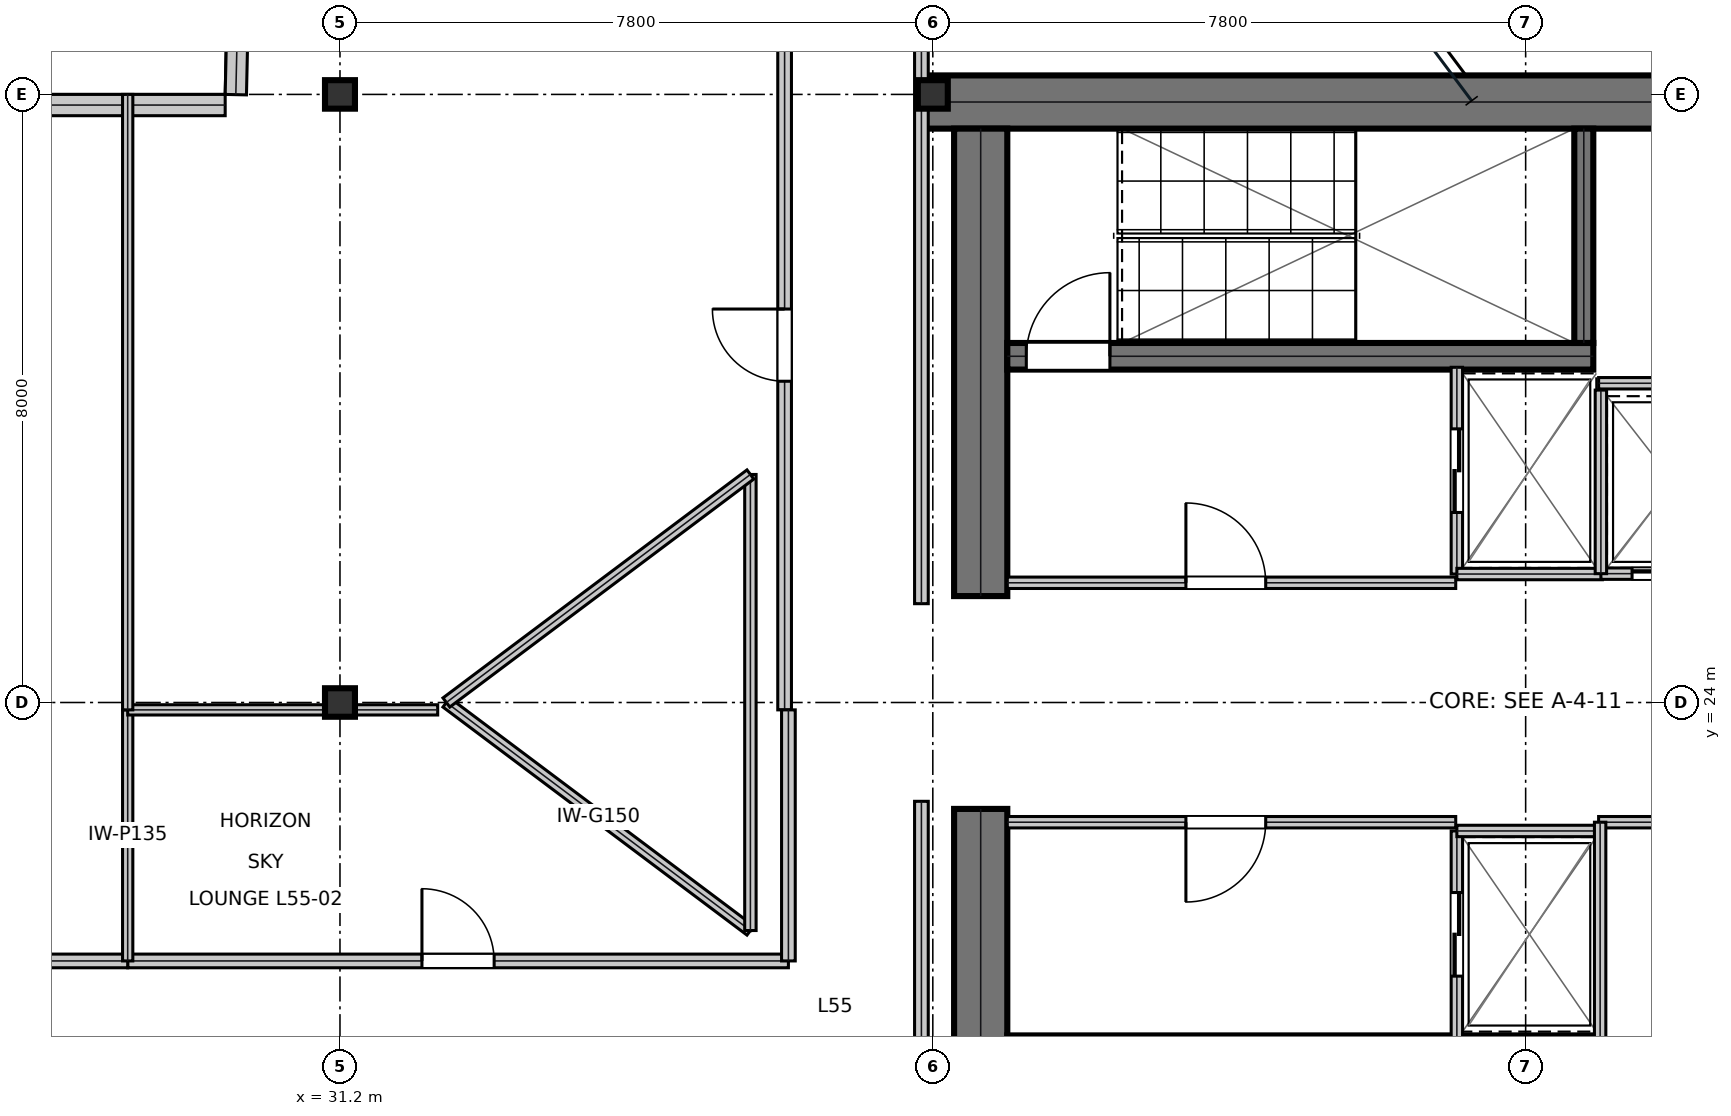
"""IFC4 building model, lengths in metres.
Left out: names, types, materials, properties, quantities, classifications, styles, units other than length and angle.
Written with IfcOpenShell. Run it as: python <this file> out.ifc"""

import sys

from ifc_helpers import new_model, si_unit, direction, frame, frame_2d, origin, origin_2d, place, context, subcontext, project, spatial, rectangle, i_section, extrude, element, fill, save


model = new_model("IFC4")
c1 = context("Model", 3, precision=1e-05, world=origin(), true_north=direction((0.0, 1.0)))
c2 = subcontext(c1, "Body", "Model", "MODEL_VIEW")
j1 = project(units=[si_unit("LENGTHUNIT", "METRE"), si_unit("PLANEANGLEUNIT", "RADIAN")], contexts=[c1])
p1 = place(None, origin())
s1 = spatial("IfcSite", under=j1, at=p1, CompositionType="ELEMENT")
p2 = place(p1, origin())
s2 = spatial("IfcBuilding", under=s1, at=p2, CompositionType="ELEMENT")
p3 = place(p2, frame((0.0, 0.0, 236.4)))
s3 = spatial("IfcBuildingStorey", under=s2, at=p3, CompositionType="ELEMENT", Elevation=236.4)
p4 = place(p3, frame((38.8, 31.9, 0.0), z_axis=(0.0, 0.0, 1.0), x_axis=(1.0, 0.0, 0.0)))
e1 = element("IfcWall", 1, at=p4, inside=s3, PredefinedType="SHEAR", context=c2, shape_type="SweptSolid", body=[
    extrude(rectangle(XDim=16.0, YDim=0.7, at=frame_2d((8.0, 0.0))), origin(), (0.0, 0.0, 1.0), 3.79),
])
for number, where, z_axis, x_axis in (
    (2, (39.63, 16.45, 0.0), (0.0, 0.0, 1.0), (0.0, 1.0, 0.0)),
    (3, (39.63, 25.4, 0.0), (0.0, 0.0, 1.0), (0.0, 1.0, 0.0)),
):
    element("IfcWall", number, at=place(p3, frame(where, z_axis=z_axis, x_axis=x_axis)), inside=s3, PredefinedType="SHEAR", context=c2, shape_type="SweptSolid", body=[
        extrude(rectangle(XDim=6.15, YDim=0.7, at=frame_2d((3.075, 0.0))), origin(), (0.0, 0.0, 1.0), 3.79),
    ])
p5 = place(p3, frame((39.98, 28.555, 0.0), z_axis=(0.0, 0.0, 1.0), x_axis=(1.0, 0.0, 0.0)))
e4 = element("IfcWall", 4, at=p5, inside=s3, PredefinedType="SHEAR", context=c2, shape_type="SweptSolid", body=[
    extrude(rectangle(XDim=7.71, YDim=0.35, at=frame_2d((3.855, 0.0))), origin(), (0.0, 0.0, 1.0), 3.79),
])
p6 = place(p5, frame((0.25, 0.0, 0.0)))
e5 = element("IfcOpeningElement", 5, at=p6, cuts=e4, PredefinedType="OPENING", context=c2, shape_type="SweptSolid", body=[
    extrude(rectangle(XDim=1.1, YDim=2.15, at=frame_2d((0.55, 1.075))), frame((0.0, 0.185, 0.0), z_axis=(0.0, -1.0, 0.0), x_axis=(1.0, 0.0, 0.0)), (0.0, 0.0, 1.0), 0.37),
])
p7 = place(p3, frame((39.98, 19.445, 0.0), z_axis=(0.0, 0.0, 1.0), x_axis=(1.0, 0.0, 0.0)))
e6 = element("IfcWall", 6, at=p7, inside=s3, PredefinedType="SHEAR", context=c2, shape_type="SweptSolid", body=[
    extrude(rectangle(XDim=7.71, YDim=0.35, at=frame_2d((3.855, 0.0))), origin(), (0.0, 0.0, 1.0), 3.79),
])
p8 = place(p7, frame((0.25, 0.0, 0.0)))
e7 = element("IfcOpeningElement", 7, at=p8, cuts=e6, PredefinedType="OPENING", context=c2, shape_type="SweptSolid", body=[
    extrude(rectangle(XDim=1.1, YDim=2.15, at=frame_2d((0.55, 1.075))), frame((0.0, 0.185, 0.0), z_axis=(0.0, -1.0, 0.0), x_axis=(1.0, 0.0, 0.0)), (0.0, 0.0, 1.0), 0.37),
])
p9 = place(p3, frame((47.565, 28.73, 0.0), z_axis=(0.0, 0.0, 1.0), x_axis=(0.0, 1.0, 0.0)))
e8 = element("IfcWall", 8, at=p9, inside=s3, PredefinedType="SHEAR", context=c2, shape_type="SweptSolid", body=[
    extrude(rectangle(XDim=2.82, YDim=0.25, at=frame_2d((1.41, 0.0))), origin(), (0.0, 0.0, 1.0), 3.79),
])
for number, where, z_axis, x_axis in (
    (9, (31.2, 24.0, 0.0), (0.0, 0.0, 1.0), (1.0, 0.0, 0.0)),
    (10, (31.2, 32.0, 0.0), (0.0, 0.0, 1.0), (1.0, 0.0, 0.0)),
    (11, (39.0, 32.0, 0.0), (0.0, 0.0, 1.0), (1.0, 0.0, 0.0)),
):
    element("IfcColumn", number, at=place(p3, frame(where, z_axis=z_axis, x_axis=x_axis)), inside=s3, PredefinedType="COLUMN", context=c2, shape_type="SweptSolid", body=[
        extrude(i_section(OverallWidth=0.394, OverallDepth=0.375, WebThickness=0.017, FlangeThickness=0.028, at=origin_2d()), origin(), (0.0, 0.0, 1.0), 4.044),
    ])
p10 = place(p3, frame((29.985, 39.001, 0.0), z_axis=(0.0, 0.0, 1.0), x_axis=(-0.022163330023, -0.999754363232, 0.0)))
e12 = element("IfcWall", 12, at=p10, inside=s3, PredefinedType="STANDARD", context=c2, shape_type="SweptSolid", body=[
    extrude(rectangle(XDim=7.006, YDim=0.28, at=frame_2d((3.503, 0.0))), origin(), (0.0, 0.0, 1.0), 3.79),
])
p11 = place(p3, frame((29.69, 31.86, 0.0), z_axis=(0.0, 0.0, 1.0), x_axis=(-1.0, 0.0, 0.0)))
e13 = element("IfcWall", 13, at=p11, inside=s3, PredefinedType="STANDARD", context=c2, shape_type="SweptSolid", body=[
    extrude(rectangle(XDim=2.818, YDim=0.28, at=frame_2d((1.409, 0.0))), origin(), (0.0, 0.0, 1.0), 3.79),
])
p12 = place(p3, frame((39.98, 25.575, 0.0), z_axis=(0.0, 0.0, 1.0), x_axis=(1.0, 0.0, 0.0)))
e14 = element("IfcWall", 14, at=p12, inside=s3, PredefinedType="PARTITIONING", context=c2, shape_type="SweptSolid", body=[
    extrude(rectangle(XDim=5.9, YDim=0.15, at=frame_2d((2.95, 0.0))), origin(), (0.0, 0.0, 1.0), 3.79),
])
p13 = place(p12, frame((2.35, 0.0, 0.0)))
e15 = element("IfcOpeningElement", 15, at=p13, cuts=e14, PredefinedType="OPENING", context=c2, shape_type="SweptSolid", body=[
    extrude(rectangle(XDim=1.05, YDim=2.15, at=frame_2d((0.525, 1.075))), frame((0.0, 0.085, 0.0), z_axis=(0.0, -1.0, 0.0), x_axis=(1.0, 0.0, 0.0)), (0.0, 0.0, 1.0), 0.17),
])
p14 = place(p3, frame((39.98, 22.425, 0.0), z_axis=(0.0, 0.0, 1.0), x_axis=(1.0, 0.0, 0.0)))
e16 = element("IfcWall", 16, at=p14, inside=s3, PredefinedType="PARTITIONING", context=c2, shape_type="SweptSolid", body=[
    extrude(rectangle(XDim=5.9, YDim=0.15, at=frame_2d((2.95, 0.0))), origin(), (0.0, 0.0, 1.0), 3.79),
])
p15 = place(p14, frame((2.35, 0.0, 0.0)))
e17 = element("IfcOpeningElement", 17, at=p15, cuts=e16, PredefinedType="OPENING", context=c2, shape_type="SweptSolid", body=[
    extrude(rectangle(XDim=1.05, YDim=2.15, at=frame_2d((0.525, 1.075))), frame((0.0, 0.085, 0.0), z_axis=(0.0, -1.0, 0.0), x_axis=(1.0, 0.0, 0.0)), (0.0, 0.0, 1.0), 0.17),
])
p16 = place(p3, frame((45.895, 25.69, 0.0), z_axis=(0.0, 0.0, 1.0), x_axis=(0.0, 1.0, 0.0)))
e18 = element("IfcWall", 18, at=p16, inside=s3, PredefinedType="PARTITIONING", context=c2, shape_type="SweptSolid", body=[
    extrude(rectangle(XDim=2.72, YDim=0.15, at=frame_2d((1.36, 0.0))), origin(), (0.0, 0.0, 1.0), 3.79),
])
p17 = place(p16, frame((0.81, 0.0, 0.0)))
e19 = element("IfcOpeningElement", 19, at=p17, cuts=e18, PredefinedType="OPENING", context=c2, shape_type="SweptSolid", body=[
    extrude(rectangle(XDim=1.1, YDim=2.15, at=frame_2d((0.55, 1.075))), frame((0.0, 0.085, 0.0), z_axis=(0.0, -1.0, 0.0), x_axis=(1.0, 0.0, 0.0)), (0.0, 0.0, 1.0), 0.17),
])
p18 = place(p3, frame((45.895, 25.69, 0.0), z_axis=(0.0, 0.0, 1.0), x_axis=(1.0, 0.0, 0.0)))
e20 = element("IfcWall", 20, at=p18, inside=s3, PredefinedType="PARTITIONING", context=c2, shape_type="SweptSolid", body=[
    extrude(rectangle(XDim=1.915, YDim=0.15, at=frame_2d((0.958, 0.0))), origin(), (0.0, 0.0, 1.0), 3.79),
])
p19 = place(p3, frame((45.895, 19.59, 0.0), z_axis=(0.0, 0.0, 1.0), x_axis=(0.0, 1.0, 0.0)))
e21 = element("IfcWall", 21, at=p19, inside=s3, PredefinedType="PARTITIONING", context=c2, shape_type="SweptSolid", body=[
    extrude(rectangle(XDim=2.72, YDim=0.15, at=frame_2d((1.36, 0.0))), origin(), (0.0, 0.0, 1.0), 3.79),
])
p20 = place(p19, frame((0.81, 0.0, 0.0)))
e22 = element("IfcOpeningElement", 22, at=p20, cuts=e21, PredefinedType="OPENING", context=c2, shape_type="SweptSolid", body=[
    extrude(rectangle(XDim=1.1, YDim=2.15, at=frame_2d((0.55, 1.075))), frame((0.0, 0.085, 0.0), z_axis=(0.0, -1.0, 0.0), x_axis=(1.0, 0.0, 0.0)), (0.0, 0.0, 1.0), 0.17),
])
p21 = place(p3, frame((45.895, 22.31, 0.0), z_axis=(0.0, 0.0, 1.0), x_axis=(1.0, 0.0, 0.0)))
e23 = element("IfcWall", 23, at=p21, inside=s3, PredefinedType="PARTITIONING", context=c2, shape_type="SweptSolid", body=[
    extrude(rectangle(XDim=1.915, YDim=0.15, at=frame_2d((0.958, 0.0))), origin(), (0.0, 0.0, 1.0), 3.79),
])
p22 = place(p3, frame((47.79, 25.695, 0.0), z_axis=(0.0, 0.0, 1.0), x_axis=(1.0, 0.0, 0.0)))
e24 = element("IfcWall", 24, at=p22, inside=s3, PredefinedType="PARTITIONING", context=c2, shape_type="SweptSolid", body=[
    extrude(rectangle(XDim=1.92, YDim=0.15, at=frame_2d((0.96, 0.0))), origin(), (0.0, 0.0, 1.0), 3.79),
])
p23 = place(p22, frame((0.41, 0.0, 0.0)))
e25 = element("IfcOpeningElement", 25, at=p23, cuts=e24, PredefinedType="OPENING", context=c2, shape_type="SweptSolid", body=[
    extrude(rectangle(XDim=1.1, YDim=2.15, at=frame_2d((0.55, 1.075))), frame((0.0, 0.085, 0.0), z_axis=(0.0, -1.0, 0.0), x_axis=(1.0, 0.0, 0.0)), (0.0, 0.0, 1.0), 0.17),
])
p24 = place(p3, frame((47.79, 25.695, 0.0), z_axis=(0.0, 0.0, 1.0), x_axis=(0.0, 1.0, 0.0)))
e26 = element("IfcWall", 26, at=p24, inside=s3, PredefinedType="PARTITIONING", context=c2, shape_type="SweptSolid", body=[
    extrude(rectangle(XDim=2.415, YDim=0.15, at=frame_2d((1.208, 0.0))), origin(), (0.0, 0.0, 1.0), 3.79),
])
p25 = place(p3, frame((47.76, 22.425, 0.0), z_axis=(0.0, 0.0, 1.0), x_axis=(1.0, 0.0, 0.0)))
e27 = element("IfcWall", 27, at=p25, inside=s3, PredefinedType="PARTITIONING", context=c2, shape_type="SweptSolid", body=[
    extrude(rectangle(XDim=1.96, YDim=0.15, at=frame_2d((0.98, 0.0))), origin(), (0.0, 0.0, 1.0), 3.79),
])
p26 = place(p3, frame((47.78, 16.45, 0.0), z_axis=(0.0, 0.0, 1.0), x_axis=(0.0, 1.0, 0.0)))
e28 = element("IfcWall", 28, at=p26, inside=s3, PredefinedType="PARTITIONING", context=c2, shape_type="SweptSolid", body=[
    extrude(rectangle(XDim=5.975, YDim=0.15, at=frame_2d((2.988, 0.0))), origin(), (0.0, 0.0, 1.0), 3.79),
])
p27 = place(p3, frame((47.76, 28.2, 0.0), z_axis=(0.0, 0.0, 1.0), x_axis=(1.0, 0.0, 0.0)))
e29 = element("IfcWall", 29, at=p27, inside=s3, PredefinedType="PARTITIONING", context=c2, shape_type="SweptSolid", body=[
    extrude(rectangle(XDim=2.04, YDim=0.15, at=frame_2d((1.02, 0.0))), origin(), (0.0, 0.0, 1.0), 3.79),
])
p28 = place(p3, frame((28.407, 20.6, 0.0), z_axis=(0.0, 0.0, 1.0), x_axis=(1.0, 0.0, 0.0)))
e30 = element("IfcWall", 30, at=p28, inside=s3, PredefinedType="SOLIDWALL", context=c2, shape_type="SweptSolid", body=[
    extrude(rectangle(XDim=8.693, YDim=0.18, at=frame_2d((4.347, 0.0))), origin(), (0.0, 0.0, 1.0), 3.241),
])
p29 = place(p28, frame((3.872, 0.0, 0.0)))
e31 = element("IfcOpeningElement", 31, at=p29, cuts=e30, PredefinedType="OPENING", context=c2, shape_type="SweptSolid", body=[
    extrude(rectangle(XDim=0.95, YDim=2.15, at=frame_2d((0.475, 1.075))), frame((0.0, 0.1, 0.0), z_axis=(0.0, -1.0, 0.0), x_axis=(1.0, 0.0, 0.0)), (0.0, 0.0, 1.0), 0.2),
])
p30 = place(p3, frame((37.05, 23.903, 0.0), z_axis=(0.0, 0.0, 1.0), x_axis=(0.0, 1.0, 0.0)))
e32 = element("IfcWall", 32, at=p30, inside=s3, PredefinedType="SOLIDWALL", context=c2, shape_type="SweptSolid", body=[
    extrude(rectangle(XDim=9.597, YDim=0.18, at=frame_2d((4.798, 0.0))), origin(), (0.0, 0.0, 1.0), 3.241),
])
p31 = place(p30, frame((4.323, 0.0, 0.0)))
e33 = element("IfcOpeningElement", 33, at=p31, cuts=e32, PredefinedType="OPENING", context=c2, shape_type="SweptSolid", body=[
    extrude(rectangle(XDim=0.95, YDim=2.15, at=frame_2d((0.475, 1.075))), frame((0.0, 0.1, 0.0), z_axis=(0.0, -1.0, 0.0), x_axis=(1.0, 0.0, 0.0)), (0.0, 0.0, 1.0), 0.2),
])
p32 = place(p3, frame((38.85, 18.8, 0.0), z_axis=(0.0, 0.0, 1.0), x_axis=(0.0, 1.0, 0.0)))
e34 = element("IfcWall", 34, at=p32, inside=s3, PredefinedType="SOLIDWALL", context=c2, shape_type="SweptSolid", body=[
    extrude(rectangle(XDim=3.9, YDim=0.18, at=frame_2d((1.95, 0.0))), origin(), (0.0, 0.0, 1.0), 3.468),
])
p33 = place(p3, frame((37.1, 20.6, 0.0), z_axis=(0.0, 0.0, 1.0), x_axis=(0.0, 1.0, 0.0)))
e35 = element("IfcWall", 35, at=p33, inside=s3, PredefinedType="SOLIDWALL", context=c2, shape_type="SweptSolid", body=[
    extrude(rectangle(XDim=3.303, YDim=0.18, at=frame_2d((1.651, 0.0))), origin(), (0.0, 0.0, 1.0), 3.79),
])
p34 = place(p3, frame((26.4, 20.6, 0.0), z_axis=(0.0, 0.0, 1.0), x_axis=(1.0, 0.0, 0.0)))
e36 = element("IfcWall", 36, at=p34, inside=s3, PredefinedType="SOLIDWALL", context=c2, shape_type="SweptSolid", body=[
    extrude(rectangle(XDim=2.007, YDim=0.18, at=frame_2d((1.003, 0.0))), origin(), (0.0, 0.0, 1.0), 3.79),
])
p35 = place(p3, frame((38.85, 25.3, 0.0), z_axis=(0.0, 0.0, 1.0), x_axis=(0.0, 1.0, 0.0)))
e37 = element("IfcWall", 37, at=p35, inside=s3, PredefinedType="SOLIDWALL", context=c2, shape_type="SweptSolid", body=[
    extrude(rectangle(XDim=8.2, YDim=0.18, at=frame_2d((4.1, 0.0))), origin(), (0.0, 0.0, 1.0), 3.241),
])
p36 = place(p3, frame((28.407, 20.6, 0.0), z_axis=(0.0, 0.0, 1.0), x_axis=(0.0, 1.0, 0.0)))
e38 = element("IfcWall", 38, at=p36, inside=s3, PredefinedType="PARTITIONING", context=c2, shape_type="SweptSolid", body=[
    extrude(rectangle(XDim=3.303, YDim=0.135, at=frame_2d((1.651, 0.0))), origin(), (0.0, 0.0, 1.0), 3.241),
])
p37 = place(p3, frame((28.407, 23.903, 0.0), z_axis=(0.0, 0.0, 1.0), x_axis=(1.0, 0.0, 0.0)))
e39 = element("IfcWall", 39, at=p37, inside=s3, PredefinedType="PARTITIONING", context=c2, shape_type="SweptSolid", body=[
    extrude(rectangle(XDim=4.079, YDim=0.135, at=frame_2d((2.04, 0.0))), origin(), (0.0, 0.0, 1.0), 3.241),
])
p38 = place(p3, frame((28.407, 23.903, 0.0), z_axis=(0.0, 0.0, 1.0), x_axis=(0.0, 1.0, 0.0)))
e40 = element("IfcWall", 40, at=p38, inside=s3, PredefinedType="PARTITIONING", context=c2, shape_type="SweptSolid", body=[
    extrude(rectangle(XDim=8.097, YDim=0.135, at=frame_2d((4.048, 0.0))), origin(), (0.0, 0.0, 1.0), 3.241),
])
p39 = place(p3, frame((32.6, 24.0, 0.0), z_axis=(0.0, 0.0, 1.0), x_axis=(0.8, -0.6, 0.0)))
e41 = element("IfcWall", 41, at=p39, inside=s3, PredefinedType="MOVABLE", context=c2, shape_type="SweptSolid", body=[
    extrude(rectangle(XDim=5.0, YDim=0.15, at=frame_2d((2.5, 0.0))), origin(), (0.0, 0.0, 1.0), 3.79),
])
p40 = place(p3, frame((36.6, 21.0, 0.0), z_axis=(0.0, 0.0, 1.0), x_axis=(0.0, 1.0, 0.0)))
e42 = element("IfcWall", 42, at=p40, inside=s3, PredefinedType="MOVABLE", context=c2, shape_type="SweptSolid", body=[
    extrude(rectangle(XDim=6.0, YDim=0.15, at=frame_2d((3.0, 0.0))), origin(), (0.0, 0.0, 1.0), 3.79),
])
p41 = place(p3, frame((36.6, 27.0, 0.0), z_axis=(0.0, 0.0, 1.0), x_axis=(-0.8, -0.6, 0.0)))
e43 = element("IfcWall", 43, at=p41, inside=s3, PredefinedType="MOVABLE", context=c2, shape_type="SweptSolid", body=[
    extrude(rectangle(XDim=5.0, YDim=0.15, at=frame_2d((2.5, 0.0))), origin(), (0.0, 0.0, 1.0), 3.79),
])
p42 = place(p13, origin())
e44 = element("IfcDoor", 44, at=p42, inside=s3, OperationType="SINGLE_SWING_LEFT", PredefinedType="DOOR", context=c2, shape_type="SweptSolid", body=[
    extrude(rectangle(XDim=1.05, YDim=2.15, at=frame_2d((0.525, 1.075))), frame((0.0, 0.025, 0.0), z_axis=(0.0, -1.0, 0.0), x_axis=(1.0, 0.0, 0.0)), (0.0, 0.0, 1.0), 0.05),
])
fill(e15, e44)
p43 = place(p15, frame((1.05, 0.0, 0.0), z_axis=(0.0, 0.0, 1.0), x_axis=(-1.0, 0.0, 0.0)))
e45 = element("IfcDoor", 45, at=p43, inside=s3, OperationType="SINGLE_SWING_RIGHT", PredefinedType="DOOR", context=c2, shape_type="SweptSolid", body=[
    extrude(rectangle(XDim=1.05, YDim=2.15, at=frame_2d((0.525, 1.075))), frame((0.0, 0.025, 0.0), z_axis=(0.0, -1.0, 0.0), x_axis=(1.0, 0.0, 0.0)), (0.0, 0.0, 1.0), 0.05),
])
fill(e17, e45)
p44 = place(p17, frame((1.1, 0.0, 0.0), z_axis=(0.0, 0.0, 1.0), x_axis=(-1.0, 0.0, 0.0)))
e46 = element("IfcDoor", 46, at=p44, inside=s3, OperationType="DOUBLE_DOOR_SLIDING", PredefinedType="DOOR", context=c2, shape_type="SweptSolid", body=[
    extrude(rectangle(XDim=1.1, YDim=2.15, at=frame_2d((0.55, 1.075))), frame((0.0, 0.025, 0.0), z_axis=(0.0, -1.0, 0.0), x_axis=(1.0, 0.0, 0.0)), (0.0, 0.0, 1.0), 0.05),
])
fill(e19, e46)
p45 = place(p20, frame((1.1, 0.0, 0.0), z_axis=(0.0, 0.0, 1.0), x_axis=(-1.0, 0.0, 0.0)))
e47 = element("IfcDoor", 47, at=p45, inside=s3, OperationType="DOUBLE_DOOR_SLIDING", PredefinedType="DOOR", context=c2, shape_type="SweptSolid", body=[
    extrude(rectangle(XDim=1.1, YDim=2.15, at=frame_2d((0.55, 1.075))), frame((0.0, 0.025, 0.0), z_axis=(0.0, -1.0, 0.0), x_axis=(1.0, 0.0, 0.0)), (0.0, 0.0, 1.0), 0.05),
])
fill(e22, e47)
p46 = place(p23, frame((1.1, 0.0, 0.0), z_axis=(0.0, 0.0, 1.0), x_axis=(-1.0, 0.0, 0.0)))
e48 = element("IfcDoor", 48, at=p46, inside=s3, OperationType="DOUBLE_DOOR_SLIDING", PredefinedType="DOOR", context=c2, shape_type="SweptSolid", body=[
    extrude(rectangle(XDim=1.1, YDim=2.15, at=frame_2d((0.55, 1.075))), frame((0.0, 0.025, 0.0), z_axis=(0.0, -1.0, 0.0), x_axis=(1.0, 0.0, 0.0)), (0.0, 0.0, 1.0), 0.05),
])
fill(e25, e48)
p47 = place(p29, origin())
e49 = element("IfcDoor", 49, at=p47, inside=s3, OperationType="SINGLE_SWING_LEFT", PredefinedType="DOOR", context=c2, shape_type="SweptSolid", body=[
    extrude(rectangle(XDim=0.95, YDim=2.15, at=frame_2d((0.475, 1.075))), frame((0.0, 0.025, 0.0), z_axis=(0.0, -1.0, 0.0), x_axis=(1.0, 0.0, 0.0)), (0.0, 0.0, 1.0), 0.05),
])
fill(e31, e49)
p48 = place(p31, origin())
e50 = element("IfcDoor", 50, at=p48, inside=s3, OperationType="SINGLE_SWING_RIGHT", PredefinedType="DOOR", context=c2, shape_type="SweptSolid", body=[
    extrude(rectangle(XDim=0.95, YDim=2.15, at=frame_2d((0.475, 1.075))), frame((0.0, 0.025, 0.0), z_axis=(0.0, -1.0, 0.0), x_axis=(1.0, 0.0, 0.0)), (0.0, 0.0, 1.0), 0.05),
])
fill(e33, e50)
p49 = place(p6, origin())
e51 = element("IfcDoor", 51, at=p49, inside=s3, OperationType="SINGLE_SWING_RIGHT", PredefinedType="DOOR", context=c2, shape_type="SweptSolid", body=[
    extrude(rectangle(XDim=1.1, YDim=2.15, at=frame_2d((0.55, 1.075))), frame((0.0, 0.025, 0.0), z_axis=(0.0, -1.0, 0.0), x_axis=(1.0, 0.0, 0.0)), (0.0, 0.0, 1.0), 0.05),
])
fill(e5, e51)
save(model, sys.argv[1])
